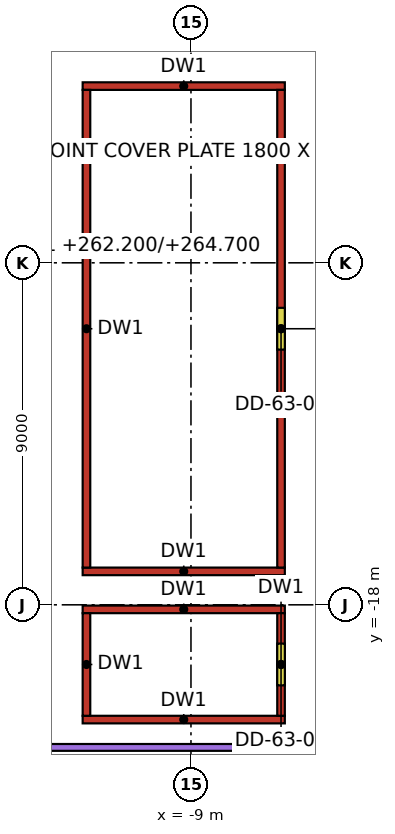
"""IFC4 building model, lengths in metres.
Left out: names, types, materials, properties, quantities, classifications, styles, units other than length and angle.
Written with IfcOpenShell. Run it as: python <this file> out.ifc"""

import sys

from ifc_helpers import new_model, si_unit, direction, frame, frame_2d, origin, place, context, subcontext, project, spatial, rectangle, extrude, element, fill, save


model = new_model("IFC4")
c1 = context("Model", 3, precision=1e-05, world=origin(), true_north=direction((0.0, 1.0)))
c2 = subcontext(c1, "Body", "Model", "MODEL_VIEW")
j1 = project(units=[si_unit("LENGTHUNIT", "METRE"), si_unit("PLANEANGLEUNIT", "RADIAN")], contexts=[c1])
p1 = place(None, origin())
s1 = spatial("IfcSite", under=j1, at=p1, CompositionType="ELEMENT")
p2 = place(p1, origin())
s2 = spatial("IfcBuilding", under=s1, at=p2, CompositionType="ELEMENT")
p3 = place(p2, frame((0.0, 0.0, 262.2)))
s3 = spatial("IfcBuildingStorey", under=s2, at=p3, CompositionType="ELEMENT", Elevation=262.2)
for number, where, z_axis, x_axis in (
    (1, (-11.85, -21.02, 0.0), (0.0, 0.0, 1.0), (1.0, 0.0, 0.0)),
    (2, (-11.85, -18.12, 0.0), (0.0, 0.0, 1.0), (1.0, 0.0, 0.0)),
):
    element("IfcWall", number, at=place(p3, frame(where, z_axis=z_axis, x_axis=x_axis)), inside=s3, PredefinedType="PARTITIONING", context=c2, shape_type="SweptSolid", body=[
        extrude(rectangle(XDim=5.32, YDim=0.2, at=frame_2d((2.66, 0.0))), origin(), (0.0, 0.0, 1.0), 3.3),
    ])
p4 = place(p3, frame((-11.75, -20.92, 0.0), z_axis=(0.0, 0.0, 1.0), x_axis=(0.0, 1.0, 0.0)))
e3 = element("IfcWall", 3, at=p4, inside=s3, PredefinedType="PARTITIONING", context=c2, shape_type="SweptSolid", body=[
    extrude(rectangle(XDim=2.7, YDim=0.2, at=frame_2d((1.35, 0.0))), origin(), (0.0, 0.0, 1.0), 3.3),
])
p5 = place(p3, frame((-6.63, -20.92, 0.0), z_axis=(0.0, 0.0, 1.0), x_axis=(0.0, 1.0, 0.0)))
e4 = element("IfcWall", 4, at=p5, inside=s3, PredefinedType="PARTITIONING", context=c2, shape_type="SweptSolid", body=[
    extrude(rectangle(XDim=2.7, YDim=0.2, at=frame_2d((1.35, 0.0))), origin(), (0.0, 0.0, 1.0), 3.3),
])
p6 = place(p5, frame((0.8, 0.0, 0.0)))
e5 = element("IfcOpeningElement", 5, at=p6, cuts=e4, PredefinedType="OPENING", context=c2, shape_type="SweptSolid", body=[
    extrude(rectangle(XDim=1.1, YDim=2.1, at=frame_2d((0.55, 1.05))), frame((0.0, 0.1, 0.0), z_axis=(0.0, -1.0, 0.0), x_axis=(1.0, 0.0, 0.0)), (0.0, 0.0, 1.0), 0.2),
])
for number, where, z_axis, x_axis in (
    (6, (-11.85, -17.12, 0.0), (0.0, 0.0, 1.0), (1.0, 0.0, 0.0)),
    (7, (-11.85, -4.35, 0.0), (0.0, 0.0, 1.0), (1.0, 0.0, 0.0)),
):
    element("IfcWall", number, at=place(p3, frame(where, z_axis=z_axis, x_axis=x_axis)), inside=s3, PredefinedType="PARTITIONING", context=c2, shape_type="SweptSolid", body=[
        extrude(rectangle(XDim=5.32, YDim=0.2, at=frame_2d((2.66, 0.0))), origin(), (0.0, 0.0, 1.0), 3.3),
    ])
p7 = place(p3, frame((-11.75, -17.02, 0.0), z_axis=(0.0, 0.0, 1.0), x_axis=(0.0, 1.0, 0.0)))
e8 = element("IfcWall", 8, at=p7, inside=s3, PredefinedType="PARTITIONING", context=c2, shape_type="SweptSolid", body=[
    extrude(rectangle(XDim=12.57, YDim=0.2, at=frame_2d((6.285, 0.0))), origin(), (0.0, 0.0, 1.0), 3.3),
])
p8 = place(p3, frame((-6.63, -17.02, 0.0), z_axis=(0.0, 0.0, 1.0), x_axis=(0.0, 1.0, 0.0)))
e9 = element("IfcWall", 9, at=p8, inside=s3, PredefinedType="PARTITIONING", context=c2, shape_type="SweptSolid", body=[
    extrude(rectangle(XDim=12.57, YDim=0.2, at=frame_2d((6.285, 0.0))), origin(), (0.0, 0.0, 1.0), 3.3),
])
p9 = place(p8, frame((5.735, 0.0, 0.0)))
e10 = element("IfcOpeningElement", 10, at=p9, cuts=e9, PredefinedType="OPENING", context=c2, shape_type="SweptSolid", body=[
    extrude(rectangle(XDim=1.1, YDim=2.1, at=frame_2d((0.55, 1.05))), frame((0.0, 0.1, 0.0), z_axis=(0.0, -1.0, 0.0), x_axis=(1.0, 0.0, 0.0)), (0.0, 0.0, 1.0), 0.2),
])
p10 = place(p6, origin())
e11 = element("IfcDoor", 11, at=p10, inside=s3, OperationType="SINGLE_SWING_LEFT", PredefinedType="DOOR", context=c2, shape_type="SweptSolid", body=[
    extrude(rectangle(XDim=1.1, YDim=2.1, at=frame_2d((0.55, 1.05))), frame((0.0, 0.025, 0.0), z_axis=(0.0, -1.0, 0.0), x_axis=(1.0, 0.0, 0.0)), (0.0, 0.0, 1.0), 0.05),
])
fill(e5, e11)
p11 = place(p9, origin())
e12 = element("IfcDoor", 12, at=p11, inside=s3, OperationType="SINGLE_SWING_LEFT", PredefinedType="DOOR", context=c2, shape_type="SweptSolid", body=[
    extrude(rectangle(XDim=1.1, YDim=2.1, at=frame_2d((0.55, 1.05))), frame((0.0, 0.025, 0.0), z_axis=(0.0, -1.0, 0.0), x_axis=(1.0, 0.0, 0.0)), (0.0, 0.0, 1.0), 0.05),
])
fill(e10, e12)
save(model, sys.argv[1])
